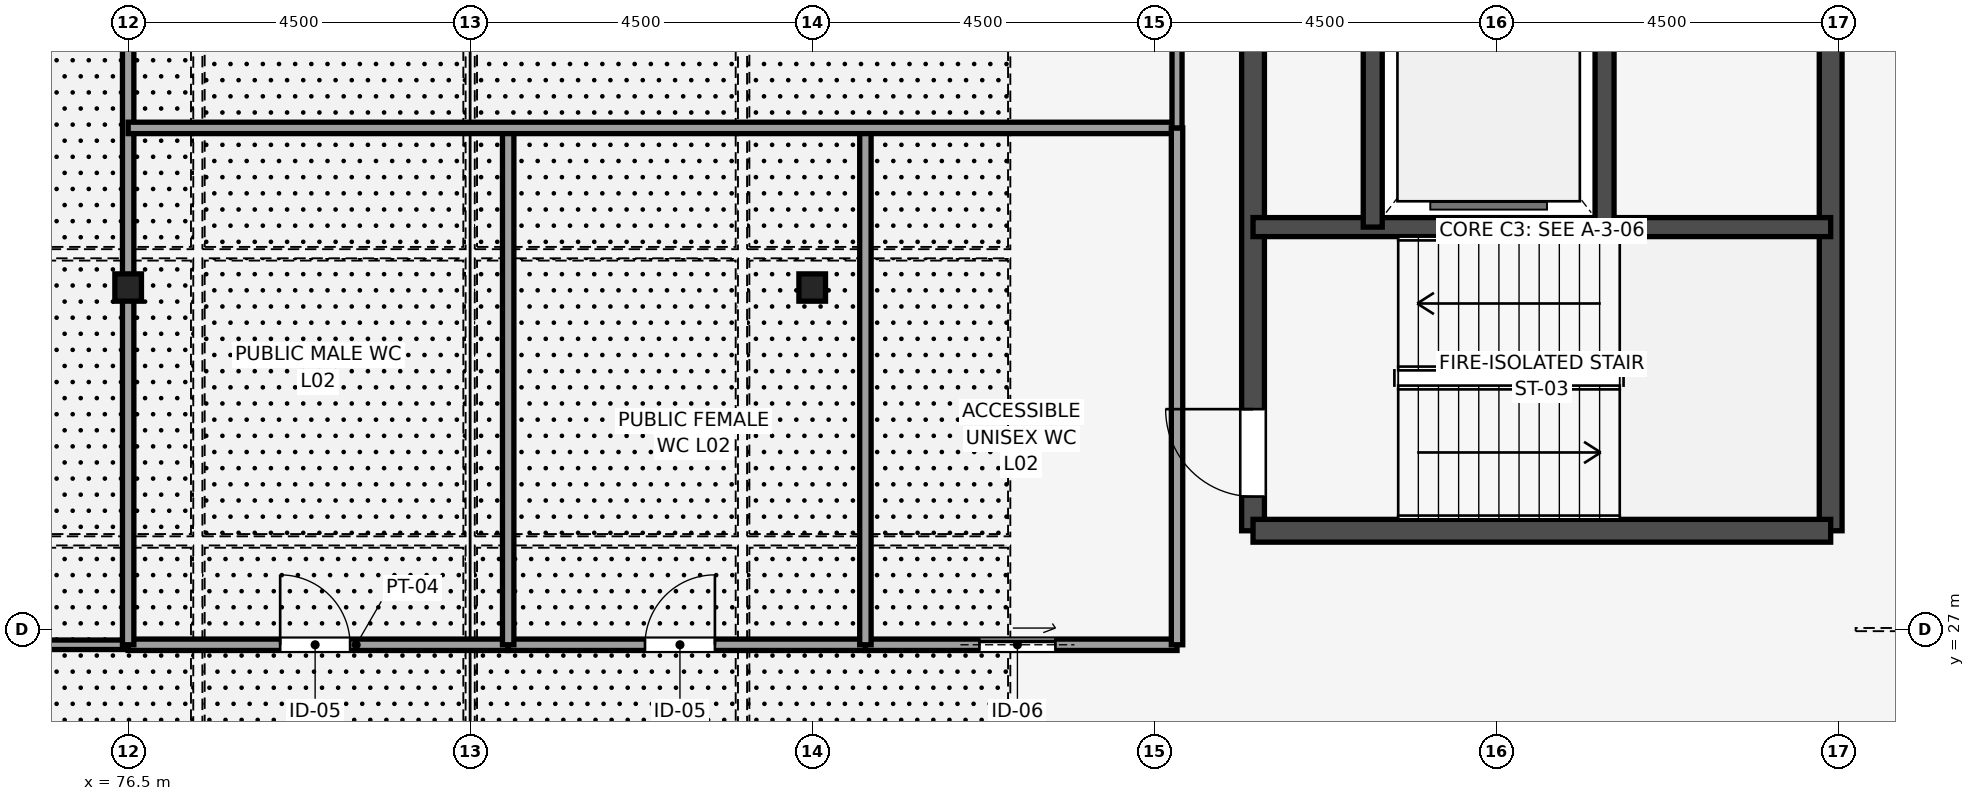
"""IFC4 building model, lengths in metres.
Left out: names, types, materials, properties, quantities, classifications, styles, units other than length and angle.
Written with IfcOpenShell. Run it as: python <this file> out.ifc"""

import sys

from ifc_helpers import new_model, si_unit, direction, frame, frame_2d, origin, origin_2d, place, context, subcontext, project, spatial, rectangle, i_section, extrude, element, fill, save


model = new_model("IFC4")
c1 = context("Model", 3, precision=1e-05, world=origin(), true_north=direction((0.0, 1.0)))
c2 = subcontext(c1, "Body", "Model", "MODEL_VIEW")
j1 = project(units=[si_unit("LENGTHUNIT", "METRE"), si_unit("PLANEANGLEUNIT", "RADIAN")], contexts=[c1])
p1 = place(None, origin())
s1 = spatial("IfcSite", under=j1, at=p1, CompositionType="ELEMENT")
p2 = place(p1, origin())
s2 = spatial("IfcBuilding", under=s1, at=p2, CompositionType="ELEMENT")
p3 = place(p2, frame((0.0, 0.0, 9.9)))
s3 = spatial("IfcBuildingStorey", under=s2, at=p3, CompositionType="ELEMENT", Elevation=9.9)
for number, where, z_axis, x_axis in (
    (1, (76.5, 31.5, 0.0), (0.0, 0.0, 1.0), (1.0, 0.0, 0.0)),
    (2, (85.5, 31.5, 0.0), (0.0, 0.0, 1.0), (1.0, 0.0, 0.0)),
):
    element("IfcColumn", number, at=place(p3, frame(where, z_axis=z_axis, x_axis=x_axis)), inside=s3, PredefinedType="COLUMN", context=c2, shape_type="SweptSolid", body=[
        extrude(i_section(OverallWidth=0.35, OverallDepth=0.359, WebThickness=0.016, FlangeThickness=0.024, FilletRadius=0.014, at=origin_2d()), origin(), (0.0, 0.0, 1.0), 4.5),
    ])
p4 = place(p3, frame((91.3, 28.3, 0.0), z_axis=(0.0, 0.0, 1.0), x_axis=(0.0, 1.0, 0.0)))
e3 = element("IfcWall", 3, at=p4, inside=s3, PredefinedType="SHEAR", context=c2, shape_type="SweptSolid", body=[
    extrude(rectangle(XDim=7.9, YDim=0.3, at=frame_2d((3.95, 0.0))), origin(), (0.0, 0.0, 1.0), 4.5),
])
p5 = place(p4, frame((0.45, 0.0, 0.0)))
e4 = element("IfcOpeningElement", 4, at=p5, cuts=e3, PredefinedType="OPENING", context=c2, shape_type="SweptSolid", body=[
    extrude(rectangle(XDim=1.15, YDim=2.15, at=frame_2d((0.575, 1.075))), frame((0.0, 0.16, 0.0), z_axis=(0.0, -1.0, 0.0), x_axis=(1.0, 0.0, 0.0)), (0.0, 0.0, 1.0), 0.32),
])
p6 = place(p3, frame((98.9, 28.3, 0.0), z_axis=(0.0, 0.0, 1.0), x_axis=(0.0, 1.0, 0.0)))
e5 = element("IfcWall", 5, at=p6, inside=s3, PredefinedType="SHEAR", context=c2, shape_type="SweptSolid", body=[
    extrude(rectangle(XDim=7.9, YDim=0.3, at=frame_2d((3.95, 0.0))), origin(), (0.0, 0.0, 1.0), 4.5),
])
p7 = place(p3, frame((91.3, 28.3, 0.0), z_axis=(0.0, 0.0, 1.0), x_axis=(1.0, 0.0, 0.0)))
e6 = element("IfcWall", 6, at=p7, inside=s3, PredefinedType="SHEAR", context=c2, shape_type="SweptSolid", body=[
    extrude(rectangle(XDim=7.6, YDim=0.3, at=frame_2d((3.8, 0.0))), origin(), (0.0, 0.0, 1.0), 4.5),
])
p8 = place(p3, frame((91.3, 32.295, 0.0), z_axis=(0.0, 0.0, 1.0), x_axis=(1.0, 0.0, 0.0)))
e7 = element("IfcWall", 7, at=p8, inside=s3, PredefinedType="SHEAR", context=c2, shape_type="SweptSolid", body=[
    extrude(rectangle(XDim=7.6, YDim=0.25, at=frame_2d((3.8, 0.0))), origin(), (0.0, 0.0, 1.0), 4.5),
])
for number, where, z_axis, x_axis in (
    (8, (92.875, 32.295, 0.0), (0.0, 0.0, 1.0), (0.0, 1.0, 0.0)),
    (9, (95.925, 32.295, 0.0), (0.0, 0.0, 1.0), (0.0, 1.0, 0.0)),
):
    element("IfcWall", number, at=place(p3, frame(where, z_axis=z_axis, x_axis=x_axis)), inside=s3, PredefinedType="SHEAR", context=c2, shape_type="SweptSolid", body=[
        extrude(rectangle(XDim=3.905, YDim=0.25, at=frame_2d((1.953, 0.0))), origin(), (0.0, 0.0, 1.0), 4.5),
    ])
p9 = place(p3, frame((58.5, 26.8, 0.0), z_axis=(0.0, 0.0, 1.0), x_axis=(1.0, 0.0, 0.0)))
e10 = element("IfcWall", 10, at=p9, inside=s3, PredefinedType="MOVABLE", context=c2, shape_type="SweptSolid", body=[
    extrude(rectangle(XDim=18.0, YDim=0.125, at=frame_2d((9.0, 0.0))), origin(), (0.0, 0.0, 1.0), 4.32),
])
p10 = place(p9, frame((5.2, 0.0, 0.0)))
e11 = element("IfcOpeningElement", 11, at=p10, cuts=e10, PredefinedType="OPENING", context=c2, shape_type="SweptSolid", body=[
    extrude(rectangle(XDim=2.0, YDim=2.4, at=frame_2d((1.0, 1.2))), frame((0.0, 0.073, 0.0), z_axis=(0.0, -1.0, 0.0), x_axis=(1.0, 0.0, 0.0)), (0.0, 0.0, 1.0), 0.145),
])
p11 = place(p3, frame((76.5, 26.8, 0.0), z_axis=(0.0, 0.0, 1.0), x_axis=(1.0, 0.0, 0.0)))
e12 = element("IfcWall", 12, at=p11, inside=s3, PredefinedType="PARTITIONING", context=c2, shape_type="SweptSolid", body=[
    extrude(rectangle(XDim=5.0, YDim=0.15, at=frame_2d((2.5, 0.0))), origin(), (0.0, 0.0, 1.0), 4.32),
])
p12 = place(p11, frame((2.0, 0.0, 0.0)))
e13 = element("IfcOpeningElement", 13, at=p12, cuts=e12, PredefinedType="OPENING", context=c2, shape_type="SweptSolid", body=[
    extrude(rectangle(XDim=0.92, YDim=2.15, at=frame_2d((0.46, 1.075))), frame((0.0, 0.085, 0.0), z_axis=(0.0, -1.0, 0.0), x_axis=(1.0, 0.0, 0.0)), (0.0, 0.0, 1.0), 0.17),
])
p13 = place(p3, frame((81.5, 26.8, 0.0), z_axis=(0.0, 0.0, 1.0), x_axis=(1.0, 0.0, 0.0)))
e14 = element("IfcWall", 14, at=p13, inside=s3, PredefinedType="PARTITIONING", context=c2, shape_type="SweptSolid", body=[
    extrude(rectangle(XDim=4.7, YDim=0.15, at=frame_2d((2.35, 0.0))), origin(), (0.0, 0.0, 1.0), 4.32),
])
p14 = place(p13, frame((1.8, 0.0, 0.0)))
e15 = element("IfcOpeningElement", 15, at=p14, cuts=e14, PredefinedType="OPENING", context=c2, shape_type="SweptSolid", body=[
    extrude(rectangle(XDim=0.92, YDim=2.15, at=frame_2d((0.46, 1.075))), frame((0.0, 0.085, 0.0), z_axis=(0.0, -1.0, 0.0), x_axis=(1.0, 0.0, 0.0)), (0.0, 0.0, 1.0), 0.17),
])
p15 = place(p3, frame((86.2, 26.8, 0.0), z_axis=(0.0, 0.0, 1.0), x_axis=(1.0, 0.0, 0.0)))
e16 = element("IfcWall", 16, at=p15, inside=s3, PredefinedType="PARTITIONING", context=c2, shape_type="SweptSolid", body=[
    extrude(rectangle(XDim=4.1, YDim=0.15, at=frame_2d((2.05, 0.0))), origin(), (0.0, 0.0, 1.0), 4.32),
])
p16 = place(p15, frame((1.5, 0.0, 0.0)))
e17 = element("IfcOpeningElement", 17, at=p16, cuts=e16, PredefinedType="OPENING", context=c2, shape_type="SweptSolid", body=[
    extrude(rectangle(XDim=1.0, YDim=2.15, at=frame_2d((0.5, 1.075))), frame((0.0, 0.085, 0.0), z_axis=(0.0, -1.0, 0.0), x_axis=(1.0, 0.0, 0.0)), (0.0, 0.0, 1.0), 0.17),
])
p17 = place(p3, frame((76.5, 26.8, 0.0), z_axis=(0.0, 0.0, 1.0), x_axis=(0.0, 1.0, 0.0)))
e18 = element("IfcWall", 18, at=p17, inside=s3, PredefinedType="PARTITIONING", context=c2, shape_type="SweptSolid", body=[
    extrude(rectangle(XDim=13.7, YDim=0.15, at=frame_2d((6.85, 0.0))), origin(), (0.0, 0.0, 1.0), 3.772),
])
for number, where, z_axis, x_axis in (
    (19, (81.5, 26.8, 0.0), (0.0, 0.0, 1.0), (0.0, 1.0, 0.0)),
    (20, (86.2, 26.8, 0.0), (0.0, 0.0, 1.0), (0.0, 1.0, 0.0)),
):
    element("IfcWall", number, at=place(p3, frame(where, z_axis=z_axis, x_axis=x_axis)), inside=s3, PredefinedType="PARTITIONING", context=c2, shape_type="SweptSolid", body=[
        extrude(rectangle(XDim=6.8, YDim=0.15, at=frame_2d((3.4, 0.0))), origin(), (0.0, 0.0, 1.0), 4.32),
    ])
p18 = place(p3, frame((76.5, 33.6, 0.0), z_axis=(0.0, 0.0, 1.0), x_axis=(1.0, 0.0, 0.0)))
e21 = element("IfcWall", 21, at=p18, inside=s3, PredefinedType="PARTITIONING", context=c2, shape_type="SweptSolid", body=[
    extrude(rectangle(XDim=13.8, YDim=0.15, at=frame_2d((6.9, 0.0))), origin(), (0.0, 0.0, 1.0), 4.32),
])
p19 = place(p3, frame((90.3, 26.8, 0.0), z_axis=(0.0, 0.0, 1.0), x_axis=(0.0, 1.0, 0.0)))
e22 = element("IfcWall", 22, at=p19, inside=s3, PredefinedType="PARTITIONING", context=c2, shape_type="SweptSolid", body=[
    extrude(rectangle(XDim=6.8, YDim=0.15, at=frame_2d((3.4, 0.0))), origin(), (0.0, 0.0, 1.0), 4.32),
])
p20 = place(p3, frame((90.3, 33.6, 0.0), z_axis=(0.0, 0.0, 1.0), x_axis=(0.0, 1.0, 0.0)))
e23 = element("IfcWall", 23, at=p20, inside=s3, PredefinedType="PARTITIONING", context=c2, shape_type="SweptSolid", body=[
    extrude(rectangle(XDim=6.9, YDim=0.132, at=frame_2d((3.45, 0.0))), origin(), (0.0, 0.0, 1.0), 4.32),
])
p21 = place(p20, frame((2.6, 0.0, 0.0)))
e24 = element("IfcOpeningElement", 24, at=p21, cuts=e23, PredefinedType="OPENING", context=c2, shape_type="SweptSolid", body=[
    extrude(rectangle(XDim=1.4, YDim=2.2, at=frame_2d((0.7, 1.1))), frame((0.0, 0.076, 0.0), z_axis=(0.0, -1.0, 0.0), x_axis=(1.0, 0.0, 0.0)), (0.0, 0.0, 1.0), 0.152),
])
p22 = place(p5, origin())
e25 = element("IfcDoor", 25, at=p22, inside=s3, OperationType="SINGLE_SWING_RIGHT", PredefinedType="DOOR", context=c2, shape_type="SweptSolid", body=[
    extrude(rectangle(XDim=1.15, YDim=2.15, at=frame_2d((0.575, 1.075))), frame((0.0, 0.025, 0.0), z_axis=(0.0, -1.0, 0.0), x_axis=(1.0, 0.0, 0.0)), (0.0, 0.0, 1.0), 0.05),
])
fill(e4, e25)
p23 = place(p12, origin())
e26 = element("IfcDoor", 26, at=p23, inside=s3, OperationType="SINGLE_SWING_LEFT", PredefinedType="DOOR", context=c2, shape_type="SweptSolid", body=[
    extrude(rectangle(XDim=0.92, YDim=2.15, at=frame_2d((0.46, 1.075))), frame((0.0, 0.025, 0.0), z_axis=(0.0, -1.0, 0.0), x_axis=(1.0, 0.0, 0.0)), (0.0, 0.0, 1.0), 0.05),
])
fill(e13, e26)
p24 = place(p14, origin())
e27 = element("IfcDoor", 27, at=p24, inside=s3, OperationType="SINGLE_SWING_RIGHT", PredefinedType="DOOR", context=c2, shape_type="SweptSolid", body=[
    extrude(rectangle(XDim=0.92, YDim=2.15, at=frame_2d((0.46, 1.075))), frame((0.0, 0.025, 0.0), z_axis=(0.0, -1.0, 0.0), x_axis=(1.0, 0.0, 0.0)), (0.0, 0.0, 1.0), 0.05),
])
fill(e15, e27)
p25 = place(p16, origin())
e28 = element("IfcDoor", 28, at=p25, inside=s3, OperationType="SLIDING_TO_LEFT", PredefinedType="DOOR", context=c2, shape_type="SweptSolid", body=[
    extrude(rectangle(XDim=1.0, YDim=2.15, at=frame_2d((0.5, 1.075))), frame((0.0, 0.025, 0.0), z_axis=(0.0, -1.0, 0.0), x_axis=(1.0, 0.0, 0.0)), (0.0, 0.0, 1.0), 0.05),
])
fill(e17, e28)
save(model, sys.argv[1])
